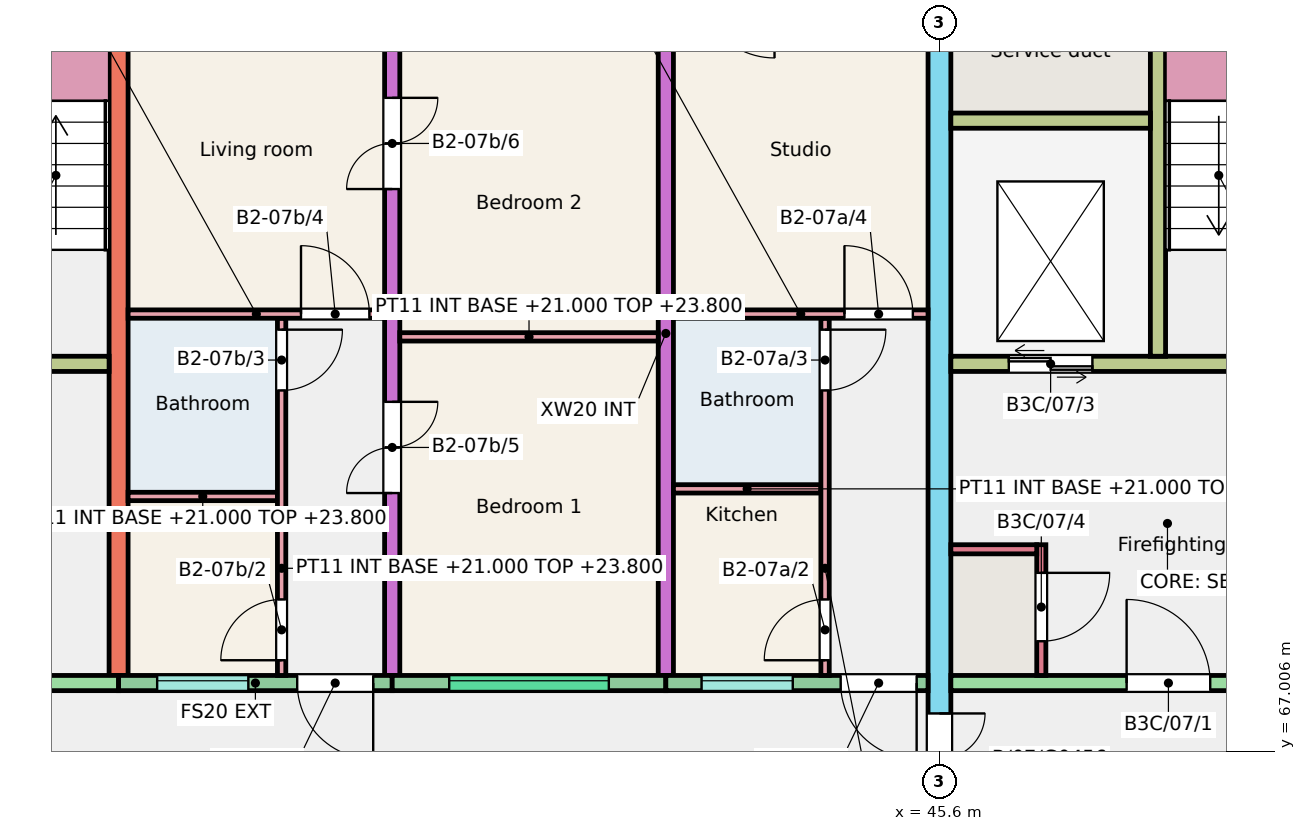
"""IFC4 building model, lengths in metres.
Left out: names, types, materials, properties, quantities, classifications, styles, units other than length and angle.
Written with IfcOpenShell. Run it as: python <this file> out.ifc"""

import sys

from ifc_helpers import new_model, si_unit, direction, frame, frame_2d, origin, place, context, subcontext, project, spatial, rectangle, extrude, element, fill, save


model = new_model("IFC4")
c1 = context("Model", 3, precision=1e-05, world=origin(), true_north=direction((0.0, 1.0)))
c2 = subcontext(c1, "Body", "Model", "MODEL_VIEW")
j1 = project(units=[si_unit("LENGTHUNIT", "METRE"), si_unit("PLANEANGLEUNIT", "RADIAN")], contexts=[c1])
p1 = place(None, origin())
s1 = spatial("IfcSite", under=j1, at=p1, CompositionType="ELEMENT")
p2 = place(p1, origin())
s2 = spatial("IfcBuilding", under=s1, at=p2, CompositionType="ELEMENT")
p3 = place(p2, frame((0.0, 0.0, 21.0)))
s3 = spatial("IfcBuildingStorey", under=s2, at=p3, CompositionType="ELEMENT", Elevation=21.0)
p4 = place(p3, frame((34.8, 68.0, 0.0), z_axis=(0.0, 0.0, 1.0), x_axis=(0.0, 1.0, 0.0)))
e1 = element("IfcWall", 1, at=p4, inside=s3, PredefinedType="SHEAR", context=c2, shape_type="SweptSolid", body=[
    extrude(rectangle(XDim=9.0, YDim=0.25, at=frame_2d((4.5, 0.0))), origin(), (0.0, 0.0, 1.0), 3.0),
])
p5 = place(p3, frame((38.4, 68.0, 0.0), z_axis=(0.0, 0.0, 1.0), x_axis=(0.0, 1.0, 0.0)))
e2 = element("IfcWall", 2, at=p5, inside=s3, PredefinedType="SHEAR", context=c2, shape_type="SweptSolid", body=[
    extrude(rectangle(XDim=9.0, YDim=0.2, at=frame_2d((4.5, 0.0))), origin(), (0.0, 0.0, 1.0), 3.0),
])
p6 = place(p5, frame((2.4, 0.0, 0.0)))
e3 = element("IfcOpeningElement", 3, at=p6, cuts=e2, PredefinedType="OPENING", context=c2, shape_type="SweptSolid", body=[
    extrude(rectangle(XDim=1.2, YDim=2.1, at=frame_2d((0.6, 1.05))), frame((0.0, 0.11, 0.0), z_axis=(0.0, -1.0, 0.0), x_axis=(1.0, 0.0, 0.0)), (0.0, 0.0, 1.0), 0.22),
])
p7 = place(p5, frame((6.4, 0.0, 0.0)))
e4 = element("IfcOpeningElement", 4, at=p7, cuts=e2, PredefinedType="OPENING", context=c2, shape_type="SweptSolid", body=[
    extrude(rectangle(XDim=1.2, YDim=2.1, at=frame_2d((0.6, 1.05))), frame((0.0, 0.11, 0.0), z_axis=(0.0, -1.0, 0.0), x_axis=(1.0, 0.0, 0.0)), (0.0, 0.0, 1.0), 0.22),
])
p8 = place(p3, frame((42.0, 68.0, 0.0), z_axis=(0.0, 0.0, 1.0), x_axis=(0.0, 1.0, 0.0)))
e5 = element("IfcWall", 5, at=p8, inside=s3, PredefinedType="SHEAR", context=c2, shape_type="SweptSolid", body=[
    extrude(rectangle(XDim=9.0, YDim=0.2, at=frame_2d((4.5, 0.0))), origin(), (0.0, 0.0, 1.0), 3.0),
])
p9 = place(p3, frame((45.6, 66.0, 0.0), z_axis=(0.0, 0.0, 1.0), x_axis=(0.0, 1.0, 0.0)))
e6 = element("IfcWall", 6, at=p9, inside=s3, PredefinedType="SHEAR", context=c2, shape_type="SweptSolid", body=[
    extrude(rectangle(XDim=11.0, YDim=0.3, at=frame_2d((5.5, 0.0))), origin(), (0.0, 0.0, 1.0), 3.0),
])
p10 = place(p9, frame((0.3, 0.0, 0.0)))
e7 = element("IfcOpeningElement", 7, at=p10, cuts=e6, PredefinedType="OPENING", context=c2, shape_type="SweptSolid", body=[
    extrude(rectangle(XDim=1.2, YDim=2.1, at=frame_2d((0.6, 1.05))), frame((0.0, 0.16, 0.0), z_axis=(0.0, -1.0, 0.0), x_axis=(1.0, 0.0, 0.0)), (0.0, 0.0, 1.0), 0.32),
])
p11 = place(p3, frame((28.95, 67.9, 0.0), z_axis=(0.0, 0.0, 1.0), x_axis=(1.0, 0.0, 0.0)))
e8 = element("IfcWall", 8, at=p11, inside=s3, PredefinedType="SHEAR", context=c2, shape_type="SweptSolid", body=[
    extrude(rectangle(XDim=5.85, YDim=0.2, at=frame_2d((2.925, 0.0))), origin(), (0.0, 0.0, 1.0), 3.0),
])
p12 = place(p11, frame((2.312, 0.0, 0.0)))
e9 = element("IfcOpeningElement", 9, at=p12, cuts=e8, PredefinedType="OPENING", context=c2, shape_type="SweptSolid", body=[
    extrude(rectangle(XDim=1.1, YDim=2.1, at=frame_2d((0.55, 1.05))), frame((0.0, 0.11, 0.0), z_axis=(0.0, -1.0, 0.0), x_axis=(1.0, 0.0, 0.0)), (0.0, 0.0, 1.0), 0.22),
])
p13 = place(p3, frame((28.95, 72.1, 0.0), z_axis=(0.0, 0.0, 1.0), x_axis=(1.0, 0.0, 0.0)))
e10 = element("IfcWall", 10, at=p13, inside=s3, PredefinedType="SHEAR", context=c2, shape_type="SweptSolid", body=[
    extrude(rectangle(XDim=5.725, YDim=0.2, at=frame_2d((2.863, 0.0))), origin(), (0.0, 0.0, 1.0), 3.0),
])
p14 = place(p13, frame((3.775, 0.0, 0.0)))
e11 = element("IfcOpeningElement", 11, at=p14, cuts=e10, PredefinedType="OPENING", context=c2, shape_type="SweptSolid", body=[
    extrude(rectangle(XDim=1.0, YDim=2.1, at=frame_2d((0.5, 1.05))), frame((0.0, 0.11, 0.0), z_axis=(0.0, -1.0, 0.0), x_axis=(1.0, 0.0, 0.0)), (0.0, 0.0, 1.0), 0.22),
])
p15 = place(p13, frame((0.762, 0.0, 0.0)))
e12 = element("IfcOpeningElement", 12, at=p15, cuts=e10, PredefinedType="OPENING", context=c2, shape_type="SweptSolid", body=[
    extrude(rectangle(XDim=1.1, YDim=2.1, at=frame_2d((0.55, 1.05))), frame((0.0, 0.11, 0.0), z_axis=(0.0, -1.0, 0.0), x_axis=(1.0, 0.0, 0.0)), (0.0, 0.0, 1.0), 0.22),
])
p16 = place(p3, frame((34.8, 67.9, 0.0), z_axis=(0.0, 0.0, 1.0), x_axis=(1.0, 0.0, 0.0)))
e13 = element("IfcWall", 13, at=p16, inside=s3, PredefinedType="SOLIDWALL", context=c2, shape_type="SweptSolid", body=[
    extrude(rectangle(XDim=3.6, YDim=0.2, at=frame_2d((1.8, 0.0))), origin(), (0.0, 0.0, 1.0), 3.0),
])
p17 = place(p16, frame((0.508, 0.0, 1.1)))
e14 = element("IfcOpeningElement", 14, at=p17, cuts=e13, PredefinedType="OPENING", context=c2, shape_type="SweptSolid", body=[
    extrude(rectangle(XDim=1.2, YDim=1.3, at=frame_2d((0.6, 0.65))), frame((0.0, 0.11, 0.0), z_axis=(0.0, -1.0, 0.0), x_axis=(1.0, 0.0, 0.0)), (0.0, 0.0, 1.0), 0.22),
])
p18 = place(p16, frame((2.35, 0.0, 0.0)))
e15 = element("IfcOpeningElement", 15, at=p18, cuts=e13, PredefinedType="OPENING", context=c2, shape_type="SweptSolid", body=[
    extrude(rectangle(XDim=1.0, YDim=2.1, at=frame_2d((0.5, 1.05))), frame((0.0, 0.11, 0.0), z_axis=(0.0, -1.0, 0.0), x_axis=(1.0, 0.0, 0.0)), (0.0, 0.0, 1.0), 0.22),
])
p19 = place(p3, frame((38.4, 67.9, 0.0), z_axis=(0.0, 0.0, 1.0), x_axis=(1.0, 0.0, 0.0)))
e16 = element("IfcWall", 16, at=p19, inside=s3, PredefinedType="SOLIDWALL", context=c2, shape_type="SweptSolid", body=[
    extrude(rectangle(XDim=3.6, YDim=0.2, at=frame_2d((1.8, 0.0))), origin(), (0.0, 0.0, 1.0), 3.0),
])
p20 = place(p19, frame((0.75, 0.0, 1.2)))
e17 = element("IfcOpeningElement", 17, at=p20, cuts=e16, PredefinedType="OPENING", context=c2, shape_type="SweptSolid", body=[
    extrude(rectangle(XDim=2.1, YDim=1.2, at=frame_2d((1.05, 0.6))), frame((0.0, 0.11, 0.0), z_axis=(0.0, -1.0, 0.0), x_axis=(1.0, 0.0, 0.0)), (0.0, 0.0, 1.0), 0.22),
])
p21 = place(p3, frame((42.0, 67.9, 0.0), z_axis=(0.0, 0.0, 1.0), x_axis=(1.0, 0.0, 0.0)))
e18 = element("IfcWall", 18, at=p21, inside=s3, PredefinedType="SOLIDWALL", context=c2, shape_type="SweptSolid", body=[
    extrude(rectangle(XDim=3.45, YDim=0.2, at=frame_2d((1.725, 0.0))), origin(), (0.0, 0.0, 1.0), 3.0),
])
p22 = place(p21, frame((0.47, 0.0, 1.1)))
e19 = element("IfcOpeningElement", 19, at=p22, cuts=e18, PredefinedType="OPENING", context=c2, shape_type="SweptSolid", body=[
    extrude(rectangle(XDim=1.2, YDim=1.3, at=frame_2d((0.6, 0.65))), frame((0.0, 0.11, 0.0), z_axis=(0.0, -1.0, 0.0), x_axis=(1.0, 0.0, 0.0)), (0.0, 0.0, 1.0), 0.22),
])
p23 = place(p21, frame((2.3, 0.0, 0.0)))
e20 = element("IfcOpeningElement", 20, at=p23, cuts=e18, PredefinedType="OPENING", context=c2, shape_type="SweptSolid", body=[
    extrude(rectangle(XDim=1.0, YDim=2.1, at=frame_2d((0.5, 1.05))), frame((0.0, 0.11, 0.0), z_axis=(0.0, -1.0, 0.0), x_axis=(1.0, 0.0, 0.0)), (0.0, 0.0, 1.0), 0.22),
])
p24 = place(p3, frame((45.75, 67.9, 0.0), z_axis=(0.0, 0.0, 1.0), x_axis=(1.0, 0.0, 0.0)))
e21 = element("IfcWall", 21, at=p24, inside=s3, PredefinedType="SHEAR", context=c2, shape_type="SweptSolid", body=[
    extrude(rectangle(XDim=5.85, YDim=0.2, at=frame_2d((2.925, 0.0))), origin(), (0.0, 0.0, 1.0), 3.0),
])
p25 = place(p24, frame((2.312, 0.0, 0.0)))
e22 = element("IfcOpeningElement", 22, at=p25, cuts=e21, PredefinedType="OPENING", context=c2, shape_type="SweptSolid", body=[
    extrude(rectangle(XDim=1.1, YDim=2.1, at=frame_2d((0.55, 1.05))), frame((0.0, 0.11, 0.0), z_axis=(0.0, -1.0, 0.0), x_axis=(1.0, 0.0, 0.0)), (0.0, 0.0, 1.0), 0.22),
])
p26 = place(p3, frame((45.75, 72.1, 0.0), z_axis=(0.0, 0.0, 1.0), x_axis=(1.0, 0.0, 0.0)))
e23 = element("IfcWall", 23, at=p26, inside=s3, PredefinedType="SHEAR", context=c2, shape_type="SweptSolid", body=[
    extrude(rectangle(XDim=5.725, YDim=0.2, at=frame_2d((2.863, 0.0))), origin(), (0.0, 0.0, 1.0), 3.0),
])
p27 = place(p26, frame((3.775, 0.0, 0.0)))
e24 = element("IfcOpeningElement", 24, at=p27, cuts=e23, PredefinedType="OPENING", context=c2, shape_type="SweptSolid", body=[
    extrude(rectangle(XDim=1.0, YDim=2.1, at=frame_2d((0.5, 1.05))), frame((0.0, 0.11, 0.0), z_axis=(0.0, -1.0, 0.0), x_axis=(1.0, 0.0, 0.0)), (0.0, 0.0, 1.0), 0.22),
])
p28 = place(p26, frame((0.762, 0.0, 0.0)))
e25 = element("IfcOpeningElement", 25, at=p28, cuts=e23, PredefinedType="OPENING", context=c2, shape_type="SweptSolid", body=[
    extrude(rectangle(XDim=1.1, YDim=2.1, at=frame_2d((0.55, 1.05))), frame((0.0, 0.11, 0.0), z_axis=(0.0, -1.0, 0.0), x_axis=(1.0, 0.0, 0.0)), (0.0, 0.0, 1.0), 0.22),
])
p29 = place(p3, frame((48.475, 72.2, 0.0), z_axis=(0.0, 0.0, 1.0), x_axis=(0.0, 1.0, 0.0)))
e26 = element("IfcWall", 26, at=p29, inside=s3, PredefinedType="SHEAR", context=c2, shape_type="SweptSolid", body=[
    extrude(rectangle(XDim=4.8, YDim=0.2, at=frame_2d((2.4, 0.0))), origin(), (0.0, 0.0, 1.0), 3.0),
])
p30 = place(p3, frame((45.75, 75.3, 0.0), z_axis=(0.0, 0.0, 1.0), x_axis=(1.0, 0.0, 0.0)))
e27 = element("IfcWall", 27, at=p30, inside=s3, PredefinedType="SHEAR", context=c2, shape_type="SweptSolid", body=[
    extrude(rectangle(XDim=2.625, YDim=0.2, at=frame_2d((1.312, 0.0))), origin(), (0.0, 0.0, 1.0), 3.0),
])
p31 = place(p3, frame((46.94, 68.0, 0.0), z_axis=(0.0, 0.0, 1.0), x_axis=(0.0, 1.0, 0.0)))
e28 = element("IfcWall", 28, at=p31, inside=s3, PredefinedType="SHEAR", context=c2, shape_type="SweptSolid", body=[
    extrude(rectangle(XDim=1.72, YDim=0.12, at=frame_2d((0.86, 0.0))), origin(), (0.0, 0.0, 1.0), 3.0),
])
p32 = place(p31, frame((0.45, 0.0, 0.0)))
e29 = element("IfcOpeningElement", 29, at=p32, cuts=e28, PredefinedType="OPENING", context=c2, shape_type="SweptSolid", body=[
    extrude(rectangle(XDim=0.9, YDim=2.1, at=frame_2d((0.45, 1.05))), frame((0.0, 0.07, 0.0), z_axis=(0.0, -1.0, 0.0), x_axis=(1.0, 0.0, 0.0)), (0.0, 0.0, 1.0), 0.14),
])
p33 = place(p3, frame((45.75, 69.66, 0.0), z_axis=(0.0, 0.0, 1.0), x_axis=(1.0, 0.0, 0.0)))
e30 = element("IfcWall", 30, at=p33, inside=s3, PredefinedType="SHEAR", context=c2, shape_type="SweptSolid", body=[
    extrude(rectangle(XDim=1.13, YDim=0.12, at=frame_2d((0.565, 0.0))), origin(), (0.0, 0.0, 1.0), 3.0),
])
p34 = place(p3, frame((42.1, 70.455, 0.0), z_axis=(0.0, 0.0, 1.0), x_axis=(1.0, 0.0, 0.0)))
e31 = element("IfcWall", 31, at=p34, inside=s3, PredefinedType="PARTITIONING", context=c2, shape_type="SweptSolid", body=[
    extrude(rectangle(XDim=1.94, YDim=0.11, at=frame_2d((0.97, 0.0))), origin(), (0.0, 0.0, 1.0), 2.75),
])
p35 = place(p3, frame((44.095, 68.0, 0.0), z_axis=(0.0, 0.0, 1.0), x_axis=(0.0, 1.0, 0.0)))
e32 = element("IfcWall", 32, at=p35, inside=s3, PredefinedType="PARTITIONING", context=c2, shape_type="SweptSolid", body=[
    extrude(rectangle(XDim=4.7, YDim=0.11, at=frame_2d((2.35, 0.0))), origin(), (0.0, 0.0, 1.0), 2.75),
])
p36 = place(p35, frame((0.2, 0.0, 0.0)))
e33 = element("IfcOpeningElement", 33, at=p36, cuts=e32, PredefinedType="OPENING", context=c2, shape_type="SweptSolid", body=[
    extrude(rectangle(XDim=0.8, YDim=2.1, at=frame_2d((0.4, 1.05))), frame((0.0, 0.065, 0.0), z_axis=(0.0, -1.0, 0.0), x_axis=(1.0, 0.0, 0.0)), (0.0, 0.0, 1.0), 0.13),
])
p37 = place(p35, frame((3.75, 0.0, 0.0)))
e34 = element("IfcOpeningElement", 34, at=p37, cuts=e32, PredefinedType="OPENING", context=c2, shape_type="SweptSolid", body=[
    extrude(rectangle(XDim=0.8, YDim=2.1, at=frame_2d((0.4, 1.05))), frame((0.0, 0.065, 0.0), z_axis=(0.0, -1.0, 0.0), x_axis=(1.0, 0.0, 0.0)), (0.0, 0.0, 1.0), 0.13),
])
p38 = place(p3, frame((42.1, 72.755, 0.0), z_axis=(0.0, 0.0, 1.0), x_axis=(1.0, 0.0, 0.0)))
e35 = element("IfcWall", 35, at=p38, inside=s3, PredefinedType="PARTITIONING", context=c2, shape_type="SweptSolid", body=[
    extrude(rectangle(XDim=3.35, YDim=0.11, at=frame_2d((1.675, 0.0))), origin(), (0.0, 0.0, 1.0), 2.75),
])
p39 = place(p38, frame((2.25, 0.0, 0.0)))
e36 = element("IfcOpeningElement", 36, at=p39, cuts=e35, PredefinedType="OPENING", context=c2, shape_type="SweptSolid", body=[
    extrude(rectangle(XDim=0.9, YDim=2.1, at=frame_2d((0.45, 1.05))), frame((0.0, 0.065, 0.0), z_axis=(0.0, -1.0, 0.0), x_axis=(1.0, 0.0, 0.0)), (0.0, 0.0, 1.0), 0.13),
])
p40 = place(p3, frame((34.925, 70.355, 0.0), z_axis=(0.0, 0.0, 1.0), x_axis=(1.0, 0.0, 0.0)))
e37 = element("IfcWall", 37, at=p40, inside=s3, PredefinedType="PARTITIONING", context=c2, shape_type="SweptSolid", body=[
    extrude(rectangle(XDim=1.965, YDim=0.11, at=frame_2d((0.982, 0.0))), origin(), (0.0, 0.0, 1.0), 2.8),
])
p41 = place(p3, frame((36.945, 68.0, 0.0), z_axis=(0.0, 0.0, 1.0), x_axis=(0.0, 1.0, 0.0)))
e38 = element("IfcWall", 38, at=p41, inside=s3, PredefinedType="PARTITIONING", context=c2, shape_type="SweptSolid", body=[
    extrude(rectangle(XDim=4.7, YDim=0.11, at=frame_2d((2.35, 0.0))), origin(), (0.0, 0.0, 1.0), 2.8),
])
p42 = place(p41, frame((0.2, 0.0, 0.0)))
e39 = element("IfcOpeningElement", 39, at=p42, cuts=e38, PredefinedType="OPENING", context=c2, shape_type="SweptSolid", body=[
    extrude(rectangle(XDim=0.8, YDim=2.1, at=frame_2d((0.4, 1.05))), frame((0.0, 0.065, 0.0), z_axis=(0.0, -1.0, 0.0), x_axis=(1.0, 0.0, 0.0)), (0.0, 0.0, 1.0), 0.13),
])
p43 = place(p41, frame((3.75, 0.0, 0.0)))
e40 = element("IfcOpeningElement", 40, at=p43, cuts=e38, PredefinedType="OPENING", context=c2, shape_type="SweptSolid", body=[
    extrude(rectangle(XDim=0.8, YDim=2.1, at=frame_2d((0.4, 1.05))), frame((0.0, 0.065, 0.0), z_axis=(0.0, -1.0, 0.0), x_axis=(1.0, 0.0, 0.0)), (0.0, 0.0, 1.0), 0.13),
])
p44 = place(p3, frame((34.925, 72.755, 0.0), z_axis=(0.0, 0.0, 1.0), x_axis=(1.0, 0.0, 0.0)))
e41 = element("IfcWall", 41, at=p44, inside=s3, PredefinedType="PARTITIONING", context=c2, shape_type="SweptSolid", body=[
    extrude(rectangle(XDim=3.375, YDim=0.11, at=frame_2d((1.688, 0.0))), origin(), (0.0, 0.0, 1.0), 2.8),
])
p45 = place(p44, frame((2.275, 0.0, 0.0)))
e42 = element("IfcOpeningElement", 42, at=p45, cuts=e41, PredefinedType="OPENING", context=c2, shape_type="SweptSolid", body=[
    extrude(rectangle(XDim=0.9, YDim=2.1, at=frame_2d((0.45, 1.05))), frame((0.0, 0.065, 0.0), z_axis=(0.0, -1.0, 0.0), x_axis=(1.0, 0.0, 0.0)), (0.0, 0.0, 1.0), 0.13),
])
p46 = place(p3, frame((38.5, 72.455, 0.0), z_axis=(0.0, 0.0, 1.0), x_axis=(1.0, 0.0, 0.0)))
e43 = element("IfcWall", 43, at=p46, inside=s3, PredefinedType="PARTITIONING", context=c2, shape_type="SweptSolid", body=[
    extrude(rectangle(XDim=3.4, YDim=0.11, at=frame_2d((1.7, 0.0))), origin(), (0.0, 0.0, 1.0), 2.8),
])
p47 = place(p22, origin())
e44 = element("IfcWindow", 44, at=p47, inside=s3, PartitioningType="SINGLE_PANEL", PredefinedType="WINDOW", context=c2, shape_type="SweptSolid", body=[
    extrude(rectangle(XDim=1.2, YDim=1.3, at=frame_2d((0.6, 0.65))), frame((0.0, 0.06, 0.0), z_axis=(0.0, -1.0, 0.0), x_axis=(1.0, 0.0, 0.0)), (0.0, 0.0, 1.0), 0.06),
])
fill(e19, e44)
p48 = place(p20, origin())
e45 = element("IfcWindow", 45, at=p48, inside=s3, PartitioningType="SINGLE_PANEL", PredefinedType="WINDOW", context=c2, shape_type="SweptSolid", body=[
    extrude(rectangle(XDim=2.1, YDim=1.2, at=frame_2d((1.05, 0.6))), frame((0.0, 0.06, 0.0), z_axis=(0.0, -1.0, 0.0), x_axis=(1.0, 0.0, 0.0)), (0.0, 0.0, 1.0), 0.06),
])
fill(e17, e45)
p49 = place(p17, origin())
e46 = element("IfcWindow", 46, at=p49, inside=s3, PartitioningType="SINGLE_PANEL", PredefinedType="WINDOW", context=c2, shape_type="SweptSolid", body=[
    extrude(rectangle(XDim=1.2, YDim=1.3, at=frame_2d((0.6, 0.65))), frame((0.0, 0.06, 0.0), z_axis=(0.0, -1.0, 0.0), x_axis=(1.0, 0.0, 0.0)), (0.0, 0.0, 1.0), 0.06),
])
fill(e14, e46)
p50 = place(p23, origin())
e47 = element("IfcDoor", 47, at=p50, inside=s3, OperationType="SINGLE_SWING_RIGHT", PredefinedType="DOOR", context=c2, shape_type="SweptSolid", body=[
    extrude(rectangle(XDim=1.0, YDim=2.1, at=frame_2d((0.5, 1.05))), frame((0.0, 0.025, 0.0), z_axis=(0.0, -1.0, 0.0), x_axis=(1.0, 0.0, 0.0)), (0.0, 0.0, 1.0), 0.05),
])
fill(e20, e47)
p51 = place(p36, origin())
e48 = element("IfcDoor", 48, at=p51, inside=s3, OperationType="SINGLE_SWING_LEFT", PredefinedType="DOOR", context=c2, shape_type="SweptSolid", body=[
    extrude(rectangle(XDim=0.8, YDim=2.1, at=frame_2d((0.4, 1.05))), frame((0.0, 0.025, 0.0), z_axis=(0.0, -1.0, 0.0), x_axis=(1.0, 0.0, 0.0)), (0.0, 0.0, 1.0), 0.05),
])
fill(e33, e48)
p52 = place(p37, origin())
e49 = element("IfcDoor", 49, at=p52, inside=s3, OperationType="SINGLE_SWING_RIGHT", PredefinedType="DOOR", context=c2, shape_type="SweptSolid", body=[
    extrude(rectangle(XDim=0.8, YDim=2.1, at=frame_2d((0.4, 1.05))), frame((0.0, 0.025, 0.0), z_axis=(0.0, -1.0, 0.0), x_axis=(1.0, 0.0, 0.0)), (0.0, 0.0, 1.0), 0.05),
])
fill(e34, e49)
p53 = place(p39, origin())
e50 = element("IfcDoor", 50, at=p53, inside=s3, OperationType="SINGLE_SWING_LEFT", PredefinedType="DOOR", context=c2, shape_type="SweptSolid", body=[
    extrude(rectangle(XDim=0.9, YDim=2.1, at=frame_2d((0.45, 1.05))), frame((0.0, 0.025, 0.0), z_axis=(0.0, -1.0, 0.0), x_axis=(1.0, 0.0, 0.0)), (0.0, 0.0, 1.0), 0.05),
])
fill(e36, e50)
p54 = place(p18, origin())
e51 = element("IfcDoor", 51, at=p54, inside=s3, OperationType="SINGLE_SWING_RIGHT", PredefinedType="DOOR", context=c2, shape_type="SweptSolid", body=[
    extrude(rectangle(XDim=1.0, YDim=2.1, at=frame_2d((0.5, 1.05))), frame((0.0, 0.025, 0.0), z_axis=(0.0, -1.0, 0.0), x_axis=(1.0, 0.0, 0.0)), (0.0, 0.0, 1.0), 0.05),
])
fill(e15, e51)
p55 = place(p42, origin())
e52 = element("IfcDoor", 52, at=p55, inside=s3, OperationType="SINGLE_SWING_LEFT", PredefinedType="DOOR", context=c2, shape_type="SweptSolid", body=[
    extrude(rectangle(XDim=0.8, YDim=2.1, at=frame_2d((0.4, 1.05))), frame((0.0, 0.025, 0.0), z_axis=(0.0, -1.0, 0.0), x_axis=(1.0, 0.0, 0.0)), (0.0, 0.0, 1.0), 0.05),
])
fill(e39, e52)
p56 = place(p43, origin())
e53 = element("IfcDoor", 53, at=p56, inside=s3, OperationType="SINGLE_SWING_RIGHT", PredefinedType="DOOR", context=c2, shape_type="SweptSolid", body=[
    extrude(rectangle(XDim=0.8, YDim=2.1, at=frame_2d((0.4, 1.05))), frame((0.0, 0.025, 0.0), z_axis=(0.0, -1.0, 0.0), x_axis=(1.0, 0.0, 0.0)), (0.0, 0.0, 1.0), 0.05),
])
fill(e40, e53)
p57 = place(p45, origin())
e54 = element("IfcDoor", 54, at=p57, inside=s3, OperationType="SINGLE_SWING_LEFT", PredefinedType="DOOR", context=c2, shape_type="SweptSolid", body=[
    extrude(rectangle(XDim=0.9, YDim=2.1, at=frame_2d((0.45, 1.05))), frame((0.0, 0.025, 0.0), z_axis=(0.0, -1.0, 0.0), x_axis=(1.0, 0.0, 0.0)), (0.0, 0.0, 1.0), 0.05),
])
fill(e42, e54)
p58 = place(p6, origin())
e55 = element("IfcDoor", 55, at=p58, inside=s3, OperationType="DOUBLE_DOOR_SINGLE_SWING", PredefinedType="DOOR", context=c2, shape_type="SweptSolid", body=[
    extrude(rectangle(XDim=1.2, YDim=2.1, at=frame_2d((0.6, 1.05))), frame((0.0, 0.025, 0.0), z_axis=(0.0, -1.0, 0.0), x_axis=(1.0, 0.0, 0.0)), (0.0, 0.0, 1.0), 0.05),
])
fill(e3, e55)
p59 = place(p7, origin())
e56 = element("IfcDoor", 56, at=p59, inside=s3, OperationType="DOUBLE_DOOR_SINGLE_SWING", PredefinedType="DOOR", context=c2, shape_type="SweptSolid", body=[
    extrude(rectangle(XDim=1.2, YDim=2.1, at=frame_2d((0.6, 1.05))), frame((0.0, 0.025, 0.0), z_axis=(0.0, -1.0, 0.0), x_axis=(1.0, 0.0, 0.0)), (0.0, 0.0, 1.0), 0.05),
])
fill(e4, e56)
p60 = place(p25, origin())
e57 = element("IfcDoor", 57, at=p60, inside=s3, OperationType="SINGLE_SWING_LEFT", PredefinedType="DOOR", context=c2, shape_type="SweptSolid", body=[
    extrude(rectangle(XDim=1.1, YDim=2.1, at=frame_2d((0.55, 1.05))), frame((0.0, 0.025, 0.0), z_axis=(0.0, -1.0, 0.0), x_axis=(1.0, 0.0, 0.0)), (0.0, 0.0, 1.0), 0.05),
])
fill(e22, e57)
p61 = place(p28, origin())
e58 = element("IfcDoor", 58, at=p61, inside=s3, OperationType="DOUBLE_DOOR_SLIDING", PredefinedType="DOOR", context=c2, shape_type="SweptSolid", body=[
    extrude(rectangle(XDim=1.1, YDim=2.1, at=frame_2d((0.55, 1.05))), frame((0.0, 0.025, 0.0), z_axis=(0.0, -1.0, 0.0), x_axis=(1.0, 0.0, 0.0)), (0.0, 0.0, 1.0), 0.05),
])
fill(e25, e58)
p62 = place(p32, origin())
e59 = element("IfcDoor", 59, at=p62, inside=s3, OperationType="SINGLE_SWING_RIGHT", PredefinedType="DOOR", context=c2, shape_type="SweptSolid", body=[
    extrude(rectangle(XDim=0.9, YDim=2.1, at=frame_2d((0.45, 1.05))), frame((0.0, 0.025, 0.0), z_axis=(0.0, -1.0, 0.0), x_axis=(1.0, 0.0, 0.0)), (0.0, 0.0, 1.0), 0.05),
])
fill(e29, e59)
p63 = place(p10, origin())
e60 = element("IfcDoor", 60, at=p63, inside=s3, OperationType="DOUBLE_DOOR_SINGLE_SWING", PredefinedType="DOOR", context=c2, shape_type="SweptSolid", body=[
    extrude(rectangle(XDim=1.2, YDim=2.1, at=frame_2d((0.6, 1.05))), frame((0.0, 0.025, 0.0), z_axis=(0.0, -1.0, 0.0), x_axis=(1.0, 0.0, 0.0)), (0.0, 0.0, 1.0), 0.05),
])
fill(e7, e60)
save(model, sys.argv[1])
